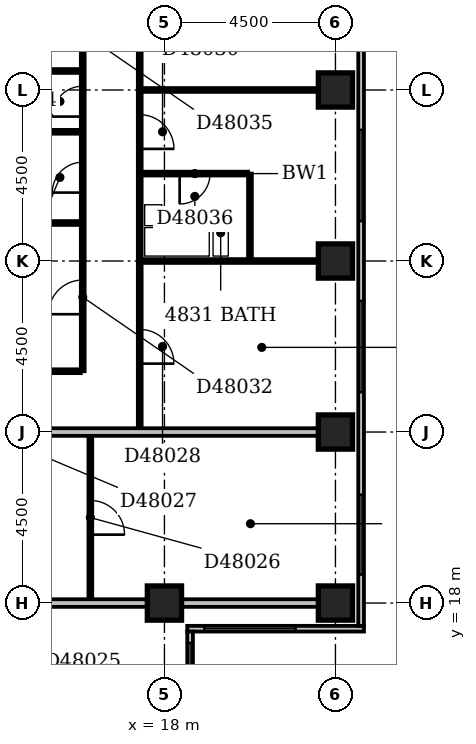
"""IFC4 building model, lengths in metres.
Left out: names, types, materials, properties, quantities, classifications, styles, units other than length and angle.
Written with IfcOpenShell. Run it as: python <this file> out.ifc"""

import sys

from ifc_helpers import new_model, si_unit, direction, frame, frame_2d, origin, origin_2d, place, context, subcontext, project, spatial, rectangle, extrude, element, fill, save


model = new_model("IFC4")
c1 = context("Model", 3, precision=1e-05, world=origin(), true_north=direction((0.0, 1.0)))
c2 = subcontext(c1, "Body", "Model", "MODEL_VIEW")
j1 = project(units=[si_unit("LENGTHUNIT", "METRE"), si_unit("PLANEANGLEUNIT", "RADIAN")], contexts=[c1])
p1 = place(None, origin())
s1 = spatial("IfcSite", under=j1, at=p1, CompositionType="ELEMENT")
p2 = place(p1, origin())
s2 = spatial("IfcBuilding", under=s1, at=p2, CompositionType="ELEMENT")
p3 = place(p2, frame((0.0, 0.0, 189.8)))
s3 = spatial("IfcBuildingStorey", under=s2, at=p3, CompositionType="ELEMENT", Elevation=189.8)
for number, where, z_axis, x_axis in (
    (1, (18.0, 18.0, -0.3), (0.0, 0.0, 1.0), (1.0, 0.0, 0.0)),
    (2, (22.5, 18.0, -0.3), (0.0, 0.0, 1.0), (1.0, 0.0, 0.0)),
    (3, (22.5, 22.5, -0.3), (0.0, 0.0, 1.0), (1.0, 0.0, 0.0)),
    (4, (22.5, 27.0, -0.3), (0.0, 0.0, 1.0), (1.0, 0.0, 0.0)),
    (5, (22.5, 31.5, -0.3), (0.0, 0.0, 1.0), (1.0, 0.0, 0.0)),
):
    element("IfcColumn", number, at=place(p3, frame(where, z_axis=z_axis, x_axis=x_axis)), inside=s3, PredefinedType="COLUMN", context=c2, shape_type="SweptSolid", body=[
        extrude(rectangle(XDim=0.9, YDim=0.9, at=origin_2d()), origin(), (0.0, 0.0, 1.0), 3.6),
    ])
p4 = place(p3, frame((18.675, 8.4, 0.0), z_axis=(0.0, 0.0, 1.0), x_axis=(0.0, 1.0, 0.0)))
e6 = element("IfcWall", 6, at=p4, inside=s3, PredefinedType="STANDARD", context=c2, shape_type="SweptSolid", body=[
    extrude(rectangle(XDim=8.85, YDim=0.15, at=frame_2d((4.425, 0.0))), origin(), (0.0, 0.0, 1.0), 2.7),
])
p5 = place(p4, frame((1.259, 0.0, 0.6)))
e7 = element("IfcOpeningElement", 7, at=p5, cuts=e6, PredefinedType="OPENING", context=c2, shape_type="SweptSolid", body=[
    extrude(rectangle(XDim=0.6, YDim=1.8, at=frame_2d((0.3, 0.9))), frame((0.0, 0.087, 0.0), z_axis=(0.0, -1.0, 0.0), x_axis=(1.0, 0.0, 0.0)), (0.0, 0.0, 1.0), 0.174),
])
p6 = place(p4, frame((3.11, 0.0, 0.6)))
e8 = element("IfcOpeningElement", 8, at=p6, cuts=e6, PredefinedType="OPENING", context=c2, shape_type="SweptSolid", body=[
    extrude(rectangle(XDim=1.2, YDim=1.8, at=frame_2d((0.6, 0.9))), frame((0.0, 0.087, 0.0), z_axis=(0.0, -1.0, 0.0), x_axis=(1.0, 0.0, 0.0)), (0.0, 0.0, 1.0), 0.174),
])
p7 = place(p4, frame((6.15, 0.0, 0.6)))
e9 = element("IfcOpeningElement", 9, at=p7, cuts=e6, PredefinedType="OPENING", context=c2, shape_type="SweptSolid", body=[
    extrude(rectangle(XDim=2.4, YDim=1.8, at=frame_2d((1.2, 0.9))), frame((0.0, 0.087, 0.0), z_axis=(0.0, -1.0, 0.0), x_axis=(1.0, 0.0, 0.0)), (0.0, 0.0, 1.0), 0.174),
])
p8 = place(p3, frame((18.6, 17.325, 0.0), z_axis=(0.0, 0.0, 1.0), x_axis=(1.0, 0.0, 0.0)))
e10 = element("IfcWall", 10, at=p8, inside=s3, PredefinedType="STANDARD", context=c2, shape_type="SweptSolid", body=[
    extrude(rectangle(XDim=4.65, YDim=0.15, at=frame_2d((2.325, 0.0))), origin(), (0.0, 0.0, 1.0), 2.7),
])
p9 = place(p8, frame((0.45, 0.0, 0.6)))
e11 = element("IfcOpeningElement", 11, at=p9, cuts=e10, PredefinedType="OPENING", context=c2, shape_type="SweptSolid", body=[
    extrude(rectangle(XDim=2.4, YDim=1.8, at=frame_2d((1.2, 0.9))), frame((0.0, 0.087, 0.0), z_axis=(0.0, -1.0, 0.0), x_axis=(1.0, 0.0, 0.0)), (0.0, 0.0, 1.0), 0.174),
])
p10 = place(p3, frame((23.175, 17.4, 0.0), z_axis=(0.0, 0.0, 1.0), x_axis=(0.0, 1.0, 0.0)))
e12 = element("IfcWall", 12, at=p10, inside=s3, PredefinedType="STANDARD", context=c2, shape_type="SweptSolid", body=[
    extrude(rectangle(XDim=17.85, YDim=0.15, at=frame_2d((8.925, 0.0))), origin(), (0.0, 0.0, 1.0), 2.7),
])
p11 = place(p10, frame((1.35, 0.0, 0.6)))
e13 = element("IfcOpeningElement", 13, at=p11, cuts=e12, PredefinedType="OPENING", context=c2, shape_type="SweptSolid", body=[
    extrude(rectangle(XDim=2.1, YDim=1.8, at=frame_2d((1.05, 0.9))), frame((0.0, 0.087, 0.0), z_axis=(0.0, -1.0, 0.0), x_axis=(1.0, 0.0, 0.0)), (0.0, 0.0, 1.0), 0.174),
])
p12 = place(p10, frame((6.15, 0.0, 0.6)))
e14 = element("IfcOpeningElement", 14, at=p12, cuts=e12, PredefinedType="OPENING", context=c2, shape_type="SweptSolid", body=[
    extrude(rectangle(XDim=2.4, YDim=1.8, at=frame_2d((1.2, 0.9))), frame((0.0, 0.087, 0.0), z_axis=(0.0, -1.0, 0.0), x_axis=(1.0, 0.0, 0.0)), (0.0, 0.0, 1.0), 0.174),
])
p13 = place(p10, frame((10.65, 0.0, 0.6)))
e15 = element("IfcOpeningElement", 15, at=p13, cuts=e12, PredefinedType="OPENING", context=c2, shape_type="SweptSolid", body=[
    extrude(rectangle(XDim=2.4, YDim=1.8, at=frame_2d((1.2, 0.9))), frame((0.0, 0.087, 0.0), z_axis=(0.0, -1.0, 0.0), x_axis=(1.0, 0.0, 0.0)), (0.0, 0.0, 1.0), 0.174),
])
p14 = place(p10, frame((15.15, 0.0, 0.6)))
e16 = element("IfcOpeningElement", 16, at=p14, cuts=e12, PredefinedType="OPENING", context=c2, shape_type="SweptSolid", body=[
    extrude(rectangle(XDim=2.4, YDim=1.8, at=frame_2d((1.2, 0.9))), frame((0.0, 0.087, 0.0), z_axis=(0.0, -1.0, 0.0), x_axis=(1.0, 0.0, 0.0)), (0.0, 0.0, 1.0), 0.174),
])
p15 = place(p3, frame((9.1, 18.0, 0.0), z_axis=(0.0, 0.0, 1.0), x_axis=(1.0, 0.0, 0.0)))
e17 = element("IfcWall", 17, at=p15, inside=s3, PredefinedType="PARTITIONING", context=c2, shape_type="SweptSolid", body=[
    extrude(rectangle(XDim=8.45, YDim=0.2, at=frame_2d((4.225, 0.0))), origin(), (0.0, 0.0, 1.0), 2.6),
])
p16 = place(p3, frame((18.45, 18.0, 0.0), z_axis=(0.0, 0.0, 1.0), x_axis=(1.0, 0.0, 0.0)))
e18 = element("IfcWall", 18, at=p16, inside=s3, PredefinedType="PARTITIONING", context=c2, shape_type="SweptSolid", body=[
    extrude(rectangle(XDim=3.6, YDim=0.2, at=frame_2d((1.8, 0.0))), origin(), (0.0, 0.0, 1.0), 2.7),
])
p17 = place(p3, frame((16.05, 18.1, 0.0), z_axis=(0.0, 0.0, 1.0), x_axis=(0.0, 1.0, 0.0)))
e19 = element("IfcWall", 19, at=p17, inside=s3, PredefinedType="PARTITIONING", context=c2, shape_type="SweptSolid", body=[
    extrude(rectangle(XDim=4.3, YDim=0.1, at=frame_2d((2.15, 0.0))), origin(), (0.0, 0.0, 1.0), 3.3),
])
p18 = place(p17, frame((1.7, 0.0, 0.0)))
e20 = element("IfcOpeningElement", 20, at=p18, cuts=e19, PredefinedType="OPENING", context=c2, shape_type="SweptSolid", body=[
    extrude(rectangle(XDim=0.9, YDim=2.1, at=frame_2d((0.45, 1.05))), frame((0.0, 0.062, 0.0), z_axis=(0.0, -1.0, 0.0), x_axis=(1.0, 0.0, 0.0)), (0.0, 0.0, 1.0), 0.124),
])
p19 = place(p3, frame((9.1, 22.5, 0.0), z_axis=(0.0, 0.0, 1.0), x_axis=(1.0, 0.0, 0.0)))
e21 = element("IfcWall", 21, at=p19, inside=s3, PredefinedType="PARTITIONING", context=c2, shape_type="SweptSolid", body=[
    extrude(rectangle(XDim=12.95, YDim=0.2, at=frame_2d((6.475, 0.0))), origin(), (0.0, 0.0, 1.0), 3.3),
])
p20 = place(p3, frame((17.35, 22.6, 0.0), z_axis=(0.0, 0.0, 1.0), x_axis=(0.0, 1.0, 0.0)))
e22 = element("IfcWall", 22, at=p20, inside=s3, PredefinedType="PARTITIONING", context=c2, shape_type="SweptSolid", body=[
    extrude(rectangle(XDim=13.3, YDim=0.1, at=frame_2d((6.65, 0.0))), origin(), (0.0, 0.0, 1.0), 3.3),
])
p21 = place(p20, frame((1.7, 0.0, 0.0)))
e23 = element("IfcOpeningElement", 23, at=p21, cuts=e22, PredefinedType="OPENING", context=c2, shape_type="SweptSolid", body=[
    extrude(rectangle(XDim=0.9, YDim=2.1, at=frame_2d((0.45, 1.05))), frame((0.0, 0.062, 0.0), z_axis=(0.0, -1.0, 0.0), x_axis=(1.0, 0.0, 0.0)), (0.0, 0.0, 1.0), 0.124),
])
p22 = place(p20, frame((7.35, 0.0, 0.0)))
e24 = element("IfcOpeningElement", 24, at=p22, cuts=e22, PredefinedType="OPENING", context=c2, shape_type="SweptSolid", body=[
    extrude(rectangle(XDim=0.9, YDim=2.1, at=frame_2d((0.45, 1.05))), frame((0.0, 0.062, 0.0), z_axis=(0.0, -1.0, 0.0), x_axis=(1.0, 0.0, 0.0)), (0.0, 0.0, 1.0), 0.124),
])
p23 = place(p20, frame((10.7, 0.0, 0.0)))
e25 = element("IfcOpeningElement", 25, at=p23, cuts=e22, PredefinedType="OPENING", context=c2, shape_type="SweptSolid", body=[
    extrude(rectangle(XDim=0.9, YDim=2.1, at=frame_2d((0.45, 1.05))), frame((0.0, 0.062, 0.0), z_axis=(0.0, -1.0, 0.0), x_axis=(1.0, 0.0, 0.0)), (0.0, 0.0, 1.0), 0.124),
])
p24 = place(p3, frame((9.1, 24.1, 0.0), z_axis=(0.0, 0.0, 1.0), x_axis=(1.0, 0.0, 0.0)))
e26 = element("IfcWall", 26, at=p24, inside=s3, PredefinedType="PARTITIONING", context=c2, shape_type="SweptSolid", body=[
    extrude(rectangle(XDim=6.7, YDim=0.1, at=frame_2d((3.35, 0.0))), origin(), (0.0, 0.0, 1.0), 3.3),
])
p25 = place(p3, frame((15.85, 24.1, 0.0), z_axis=(0.0, 0.0, 1.0), x_axis=(0.0, 1.0, 0.0)))
e27 = element("IfcWall", 27, at=p25, inside=s3, PredefinedType="PARTITIONING", context=c2, shape_type="SweptSolid", body=[
    extrude(rectangle(XDim=11.8, YDim=0.1, at=frame_2d((5.9, 0.0))), origin(), (0.0, 0.0, 1.0), 3.3),
])
p26 = place(p25, frame((4.7, 0.0, 0.0)))
e28 = element("IfcOpeningElement", 28, at=p26, cuts=e27, PredefinedType="OPENING", context=c2, shape_type="SweptSolid", body=[
    extrude(rectangle(XDim=0.8, YDim=2.1, at=frame_2d((0.4, 1.05))), frame((0.0, 0.062, 0.0), z_axis=(0.0, -1.0, 0.0), x_axis=(1.0, 0.0, 0.0)), (0.0, 0.0, 1.0), 0.124),
])
p27 = place(p25, frame((1.5, 0.0, 0.0)))
e29 = element("IfcOpeningElement", 29, at=p27, cuts=e27, PredefinedType="OPENING", context=c2, shape_type="SweptSolid", body=[
    extrude(rectangle(XDim=0.9, YDim=2.1, at=frame_2d((0.45, 1.05))), frame((0.0, 0.062, 0.0), z_axis=(0.0, -1.0, 0.0), x_axis=(1.0, 0.0, 0.0)), (0.0, 0.0, 1.0), 0.124),
])
p28 = place(p25, frame((10.5, 0.0, 0.0)))
e30 = element("IfcOpeningElement", 30, at=p28, cuts=e27, PredefinedType="OPENING", context=c2, shape_type="SweptSolid", body=[
    extrude(rectangle(XDim=0.8, YDim=2.1, at=frame_2d((0.4, 1.05))), frame((0.0, 0.062, 0.0), z_axis=(0.0, -1.0, 0.0), x_axis=(1.0, 0.0, 0.0)), (0.0, 0.0, 1.0), 0.124),
])
p29 = place(p25, frame((6.7, 0.0, 0.0)))
e31 = element("IfcOpeningElement", 31, at=p29, cuts=e27, PredefinedType="OPENING", context=c2, shape_type="SweptSolid", body=[
    extrude(rectangle(XDim=0.8, YDim=2.1, at=frame_2d((0.4, 1.05))), frame((0.0, 0.062, 0.0), z_axis=(0.0, -1.0, 0.0), x_axis=(1.0, 0.0, 0.0)), (0.0, 0.0, 1.0), 0.124),
])
p30 = place(p25, frame((8.5, 0.0, 0.0)))
e32 = element("IfcOpeningElement", 32, at=p30, cuts=e27, PredefinedType="OPENING", context=c2, shape_type="SweptSolid", body=[
    extrude(rectangle(XDim=0.8, YDim=2.1, at=frame_2d((0.4, 1.05))), frame((0.0, 0.062, 0.0), z_axis=(0.0, -1.0, 0.0), x_axis=(1.0, 0.0, 0.0)), (0.0, 0.0, 1.0), 0.124),
])
p31 = place(p3, frame((17.4, 27.0, 0.0), z_axis=(0.0, 0.0, 1.0), x_axis=(1.0, 0.0, 0.0)))
e33 = element("IfcWall", 33, at=p31, inside=s3, PredefinedType="PARTITIONING", context=c2, shape_type="SweptSolid", body=[
    extrude(rectangle(XDim=4.65, YDim=0.1, at=frame_2d((2.325, 0.0))), origin(), (0.0, 0.0, 1.0), 2.7),
])
p32 = place(p3, frame((20.25, 27.05, 0.0), z_axis=(0.0, 0.0, 1.0), x_axis=(0.0, 1.0, 0.0)))
e34 = element("IfcWall", 34, at=p32, inside=s3, PredefinedType="PLUMBINGWALL", context=c2, shape_type="SweptSolid", body=[
    extrude(rectangle(XDim=2.25, YDim=0.1, at=frame_2d((1.125, 0.0))), origin(), (0.0, 0.0, 1.0), 3.3),
])
p33 = place(p3, frame((9.1, 28.0, 0.0), z_axis=(0.0, 0.0, 1.0), x_axis=(1.0, 0.0, 0.0)))
e35 = element("IfcWall", 35, at=p33, inside=s3, PredefinedType="PLUMBINGWALL", context=c2, shape_type="SweptSolid", body=[
    extrude(rectangle(XDim=6.7, YDim=0.1, at=frame_2d((3.35, 0.0))), origin(), (0.0, 0.0, 1.0), 3.3),
])
p34 = place(p3, frame((17.4, 29.3, 0.0), z_axis=(0.0, 0.0, 1.0), x_axis=(1.0, 0.0, 0.0)))
e36 = element("IfcWall", 36, at=p34, inside=s3, PredefinedType="PLUMBINGWALL", context=c2, shape_type="SweptSolid", body=[
    extrude(rectangle(XDim=2.8, YDim=0.1, at=frame_2d((1.4, 0.0))), origin(), (0.0, 0.0, 1.0), 3.3),
])
p35 = place(p34, frame((1.0, 0.0, 0.0)))
e37 = element("IfcOpeningElement", 37, at=p35, cuts=e36, PredefinedType="OPENING", context=c2, shape_type="SweptSolid", body=[
    extrude(rectangle(XDim=0.8, YDim=2.1, at=frame_2d((0.4, 1.05))), frame((0.0, 0.062, 0.0), z_axis=(0.0, -1.0, 0.0), x_axis=(1.0, 0.0, 0.0)), (0.0, 0.0, 1.0), 0.124),
])
p36 = place(p3, frame((9.1, 30.4, 0.0), z_axis=(0.0, 0.0, 1.0), x_axis=(1.0, 0.0, 0.0)))
e38 = element("IfcWall", 38, at=p36, inside=s3, PredefinedType="PLUMBINGWALL", context=c2, shape_type="SweptSolid", body=[
    extrude(rectangle(XDim=6.7, YDim=0.1, at=frame_2d((3.35, 0.0))), origin(), (0.0, 0.0, 1.0), 3.3),
])
p37 = place(p3, frame((17.4, 31.5, 0.0), z_axis=(0.0, 0.0, 1.0), x_axis=(1.0, 0.0, 0.0)))
e39 = element("IfcWall", 39, at=p37, inside=s3, PredefinedType="PARTITIONING", context=c2, shape_type="SweptSolid", body=[
    extrude(rectangle(XDim=4.65, YDim=0.1, at=frame_2d((2.325, 0.0))), origin(), (0.0, 0.0, 1.0), 3.3),
])
p38 = place(p3, frame((9.1, 32.0, 0.0), z_axis=(0.0, 0.0, 1.0), x_axis=(1.0, 0.0, 0.0)))
e40 = element("IfcWall", 40, at=p38, inside=s3, PredefinedType="PARTITIONING", context=c2, shape_type="SweptSolid", body=[
    extrude(rectangle(XDim=6.7, YDim=0.1, at=frame_2d((3.35, 0.0))), origin(), (0.0, 0.0, 1.0), 3.3),
])
p39 = place(p7, origin())
e41 = element("IfcWindow", 41, at=p39, inside=s3, PartitioningType="SINGLE_PANEL", PredefinedType="WINDOW", context=c2, shape_type="SweptSolid", body=[
    extrude(rectangle(XDim=2.4, YDim=1.8, at=frame_2d((1.2, 0.9))), frame((0.0, 0.03, 0.0), z_axis=(0.0, -1.0, 0.0), x_axis=(1.0, 0.0, 0.0)), (0.0, 0.0, 1.0), 0.06),
])
fill(e9, e41)
p40 = place(p9, origin())
e42 = element("IfcWindow", 42, at=p40, inside=s3, PartitioningType="SINGLE_PANEL", PredefinedType="WINDOW", context=c2, shape_type="SweptSolid", body=[
    extrude(rectangle(XDim=2.4, YDim=1.8, at=frame_2d((1.2, 0.9))), frame((0.0, 0.03, 0.0), z_axis=(0.0, -1.0, 0.0), x_axis=(1.0, 0.0, 0.0)), (0.0, 0.0, 1.0), 0.06),
])
fill(e11, e42)
p41 = place(p11, origin())
e43 = element("IfcWindow", 43, at=p41, inside=s3, PartitioningType="SINGLE_PANEL", PredefinedType="WINDOW", context=c2, shape_type="SweptSolid", body=[
    extrude(rectangle(XDim=2.1, YDim=1.8, at=frame_2d((1.05, 0.9))), frame((0.0, 0.03, 0.0), z_axis=(0.0, -1.0, 0.0), x_axis=(1.0, 0.0, 0.0)), (0.0, 0.0, 1.0), 0.06),
])
fill(e13, e43)
p42 = place(p12, origin())
e44 = element("IfcWindow", 44, at=p42, inside=s3, PartitioningType="SINGLE_PANEL", PredefinedType="WINDOW", context=c2, shape_type="SweptSolid", body=[
    extrude(rectangle(XDim=2.4, YDim=1.8, at=frame_2d((1.2, 0.9))), frame((0.0, 0.03, 0.0), z_axis=(0.0, -1.0, 0.0), x_axis=(1.0, 0.0, 0.0)), (0.0, 0.0, 1.0), 0.06),
])
fill(e14, e44)
p43 = place(p13, origin())
e45 = element("IfcWindow", 45, at=p43, inside=s3, PartitioningType="SINGLE_PANEL", PredefinedType="WINDOW", context=c2, shape_type="SweptSolid", body=[
    extrude(rectangle(XDim=2.4, YDim=1.8, at=frame_2d((1.2, 0.9))), frame((0.0, 0.03, 0.0), z_axis=(0.0, -1.0, 0.0), x_axis=(1.0, 0.0, 0.0)), (0.0, 0.0, 1.0), 0.06),
])
fill(e15, e45)
p44 = place(p18, frame((0.9, 0.0, 0.0), z_axis=(0.0, 0.0, 1.0), x_axis=(-1.0, 0.0, 0.0)))
e46 = element("IfcDoor", 46, at=p44, inside=s3, OperationType="SINGLE_SWING_RIGHT", PredefinedType="DOOR", context=c2, shape_type="SweptSolid", body=[
    extrude(rectangle(XDim=0.9, YDim=2.1, at=frame_2d((0.45, 1.05))), frame((0.0, 0.025, 0.0), z_axis=(0.0, -1.0, 0.0), x_axis=(1.0, 0.0, 0.0)), (0.0, 0.0, 1.0), 0.05),
])
fill(e20, e46)
p45 = place(p21, frame((0.9, 0.0, 0.0), z_axis=(0.0, 0.0, 1.0), x_axis=(-1.0, 0.0, 0.0)))
e47 = element("IfcDoor", 47, at=p45, inside=s3, OperationType="SINGLE_SWING_RIGHT", PredefinedType="DOOR", context=c2, shape_type="SweptSolid", body=[
    extrude(rectangle(XDim=0.9, YDim=2.1, at=frame_2d((0.45, 1.05))), frame((0.0, 0.025, 0.0), z_axis=(0.0, -1.0, 0.0), x_axis=(1.0, 0.0, 0.0)), (0.0, 0.0, 1.0), 0.05),
])
fill(e23, e47)
p46 = place(p22, frame((0.9, 0.0, 0.0), z_axis=(0.0, 0.0, 1.0), x_axis=(-1.0, 0.0, 0.0)))
e48 = element("IfcDoor", 48, at=p46, inside=s3, OperationType="SINGLE_SWING_RIGHT", PredefinedType="DOOR", context=c2, shape_type="SweptSolid", body=[
    extrude(rectangle(XDim=0.9, YDim=2.1, at=frame_2d((0.45, 1.05))), frame((0.0, 0.025, 0.0), z_axis=(0.0, -1.0, 0.0), x_axis=(1.0, 0.0, 0.0)), (0.0, 0.0, 1.0), 0.05),
])
fill(e24, e48)
p47 = place(p26, origin())
e49 = element("IfcDoor", 49, at=p47, inside=s3, OperationType="SINGLE_SWING_LEFT", PredefinedType="DOOR", context=c2, shape_type="SweptSolid", body=[
    extrude(rectangle(XDim=0.8, YDim=2.1, at=frame_2d((0.4, 1.05))), frame((0.0, 0.025, 0.0), z_axis=(0.0, -1.0, 0.0), x_axis=(1.0, 0.0, 0.0)), (0.0, 0.0, 1.0), 0.05),
])
fill(e28, e49)
p48 = place(p27, origin())
e50 = element("IfcDoor", 50, at=p48, inside=s3, OperationType="SINGLE_SWING_LEFT", PredefinedType="DOOR", context=c2, shape_type="SweptSolid", body=[
    extrude(rectangle(XDim=0.9, YDim=2.1, at=frame_2d((0.45, 1.05))), frame((0.0, 0.025, 0.0), z_axis=(0.0, -1.0, 0.0), x_axis=(1.0, 0.0, 0.0)), (0.0, 0.0, 1.0), 0.05),
])
fill(e29, e50)
p49 = place(p29, origin())
e51 = element("IfcDoor", 51, at=p49, inside=s3, OperationType="SINGLE_SWING_LEFT", PredefinedType="DOOR", context=c2, shape_type="SweptSolid", body=[
    extrude(rectangle(XDim=0.8, YDim=2.1, at=frame_2d((0.4, 1.05))), frame((0.0, 0.025, 0.0), z_axis=(0.0, -1.0, 0.0), x_axis=(1.0, 0.0, 0.0)), (0.0, 0.0, 1.0), 0.05),
])
fill(e31, e51)
p50 = place(p35, frame((0.8, 0.0, 0.0), z_axis=(0.0, 0.0, 1.0), x_axis=(-1.0, 0.0, 0.0)))
e52 = element("IfcDoor", 52, at=p50, inside=s3, OperationType="SINGLE_SWING_RIGHT", PredefinedType="DOOR", context=c2, shape_type="SweptSolid", body=[
    extrude(rectangle(XDim=0.8, YDim=2.1, at=frame_2d((0.4, 1.05))), frame((0.0, 0.025, 0.0), z_axis=(0.0, -1.0, 0.0), x_axis=(1.0, 0.0, 0.0)), (0.0, 0.0, 1.0), 0.05),
])
fill(e37, e52)
save(model, sys.argv[1])
